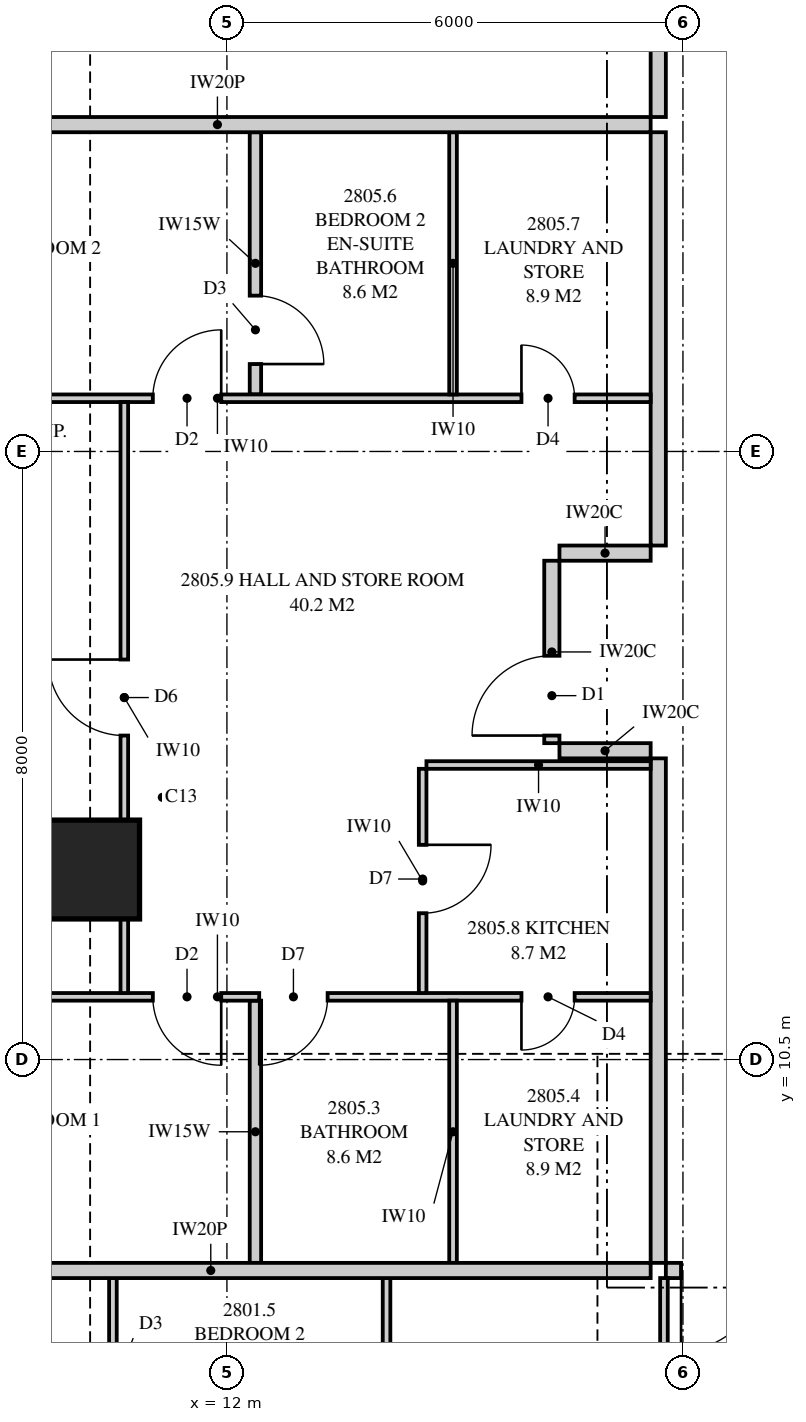
"""IFC4 building model, lengths in metres.
Left out: names, types, materials, properties, quantities, classifications, styles, units other than length and angle.
Written with IfcOpenShell. Run it as: python <this file> out.ifc"""

import sys

from ifc_helpers import new_model, si_unit, direction, frame, frame_2d, origin, origin_2d, place, context, subcontext, project, spatial, polyline, rectangle, outline, extrude, element, fill, save


model = new_model("IFC4")
c1 = context("Model", 3, precision=1e-05, world=origin(), true_north=direction((0.0, 1.0)))
c2 = subcontext(c1, "Body", "Model", "MODEL_VIEW")
j1 = project(units=[si_unit("LENGTHUNIT", "METRE"), si_unit("PLANEANGLEUNIT", "RADIAN")], contexts=[c1])
p1 = place(None, origin())
s1 = spatial("IfcSite", under=j1, at=p1, CompositionType="ELEMENT")
p2 = place(p1, origin())
s2 = spatial("IfcBuilding", under=s1, at=p2, CompositionType="ELEMENT")
p3 = place(p2, frame((0.0, 0.0, 104.85)))
s3 = spatial("IfcBuildingStorey", under=s2, at=p3, CompositionType="ELEMENT", Elevation=104.85)
p4 = place(p3, frame((10.2, 13.0, 0.0), z_axis=(0.0, 0.0, 1.0), x_axis=(1.0, 0.0, 0.0)))
e1 = element("IfcColumn", 1, at=p4, inside=s3, PredefinedType="COLUMN", context=c2, shape_type="SweptSolid", body=[
    extrude(rectangle(XDim=1.3, YDim=1.3, at=origin_2d()), origin(), (0.0, 0.0, 1.0), 3.35),
])
p5 = place(p3, frame((17.775, 7.725, 0.0), z_axis=(0.0, 0.0, 1.0), x_axis=(1.0, 0.0, 0.0)))
e2 = element("IfcWall", 2, at=p5, inside=s3, PredefinedType="PARTITIONING", context=c2, shape_type="SweptSolid", body=[
    extrude(rectangle(XDim=8.225, YDim=0.2, at=frame_2d((4.113, 0.0))), origin(), (0.0, 0.0, 1.0), 3.11),
])
p6 = place(p5, frame((0.2, 0.0, 0.0)))
e3 = element("IfcOpeningElement", 3, at=p6, cuts=e2, PredefinedType="OPENING", context=c2, shape_type="SweptSolid", body=[
    extrude(rectangle(XDim=1.05, YDim=2.2, at=frame_2d((0.525, 1.1))), frame((0.0, 0.11, 0.0), z_axis=(0.0, -1.0, 0.0), x_axis=(1.0, 0.0, 0.0)), (0.0, 0.0, 1.0), 0.22),
])
p7 = place(p3, frame((10.5, 2.76, 0.0), z_axis=(0.0, 0.0, 1.0), x_axis=(0.0, 1.0, 0.0)))
e4 = element("IfcWall", 4, at=p7, inside=s3, PredefinedType="PARTITIONING", context=c2, shape_type="SweptSolid", body=[
    extrude(outline(polyline([(0.0, 0.0), (4.865, 0.0), (4.865, 2.51), (0.368, 2.51), (0.368, 2.15), (0.0, 2.15), (0.0, 0.0)])), frame((0.0, 0.05, 0.0), z_axis=(0.0, -1.0, 0.0), x_axis=(1.0, 0.0, 0.0)), (0.0, 0.0, 1.0), 0.1),
])
p8 = place(p7, frame((0.766, 0.0, 0.0)))
e5 = element("IfcOpeningElement", 5, at=p8, cuts=e4, PredefinedType="OPENING", context=c2, shape_type="SweptSolid", body=[
    extrude(rectangle(XDim=0.9, YDim=2.1, at=frame_2d((0.45, 1.05))), frame((0.0, 0.06, 0.0), z_axis=(0.0, -1.0, 0.0), x_axis=(1.0, 0.0, 0.0)), (0.0, 0.0, 1.0), 0.12),
])
p9 = place(p7, frame((2.941, 0.0, 0.0)))
e6 = element("IfcOpeningElement", 6, at=p9, cuts=e4, PredefinedType="OPENING", context=c2, shape_type="SweptSolid", body=[
    extrude(rectangle(XDim=0.9, YDim=2.1, at=frame_2d((0.45, 1.05))), frame((0.0, 0.06, 0.0), z_axis=(0.0, -1.0, 0.0), x_axis=(1.0, 0.0, 0.0)), (0.0, 0.0, 1.0), 0.12),
])
p10 = place(p3, frame((14.1, 0.175, 0.0), z_axis=(0.0, 0.0, 1.0), x_axis=(0.0, 1.0, 0.0)))
e7 = element("IfcWall", 7, at=p10, inside=s3, PredefinedType="PARTITIONING", context=c2, shape_type="SweptSolid", body=[
    extrude(outline(polyline([(0.0, 0.0), (7.45, 0.0), (7.45, 3.11), (2.219, 3.11), (2.219, 2.15), (0.463, 2.15), (0.463, 3.11), (0.0, 3.11), (0.0, 0.0)])), frame((0.0, 0.05, 0.0), z_axis=(0.0, -1.0, 0.0), x_axis=(1.0, 0.0, 0.0)), (0.0, 0.0, 1.0), 0.1),
])
p11 = place(p10, frame((3.6, 0.0, 0.0)))
e8 = element("IfcOpeningElement", 8, at=p11, cuts=e7, PredefinedType="OPENING", context=c2, shape_type="SweptSolid", body=[
    extrude(rectangle(XDim=0.9, YDim=2.1, at=frame_2d((0.45, 1.05))), frame((0.0, 0.06, 0.0), z_axis=(0.0, -1.0, 0.0), x_axis=(1.0, 0.0, 0.0)), (0.0, 0.0, 1.0), 0.12),
])
p12 = place(p3, frame((17.75, 4.675, 0.0), z_axis=(0.0, 0.0, 1.0), x_axis=(0.0, 1.0, 0.0)))
e9 = element("IfcWall", 9, at=p12, inside=s3, PredefinedType="PARTITIONING", context=c2, shape_type="SweptSolid", body=[
    extrude(rectangle(XDim=2.95, YDim=0.1, at=frame_2d((1.475, 0.0))), origin(), (0.0, 0.0, 1.0), 3.11),
])
p13 = place(p3, frame((6.0, 7.725, 0.0), z_axis=(0.0, 0.0, 1.0), x_axis=(1.0, 0.0, 0.0)))
e10 = element("IfcWall", 10, at=p13, inside=s3, PredefinedType="PARTITIONING", context=c2, shape_type="SweptSolid", body=[
    extrude(outline(polyline([(0.0, 0.0), (11.575, 0.0), (11.575, 3.11), (11.212, 3.11), (11.212, 2.541), (10.538, 2.541), (10.538, 3.11), (5.51, 3.11), (5.51, 2.51), (2.969, 2.51), (2.969, 2.541), (2.727, 2.541), (2.727, 2.15), (0.884, 2.15), (0.884, 3.11), (0.0, 3.11), (0.0, 0.0)])), frame((0.0, 0.1, 0.0), z_axis=(0.0, -1.0, 0.0), x_axis=(1.0, 0.0, 0.0)), (0.0, 0.0, 1.0), 0.2),
])
p14 = place(p3, frame((6.175, 22.8, 0.0), z_axis=(0.0, 0.0, 1.0), x_axis=(1.0, 0.0, 0.0)))
e11 = element("IfcWall", 11, at=p14, inside=s3, PredefinedType="PARTITIONING", context=c2, shape_type="SweptSolid", body=[
    extrude(outline(polyline([(0.0, 0.0), (11.4, 0.0), (11.4, 3.11), (5.335, 3.11), (5.335, 2.51), (2.715, 2.51), (2.715, 3.11), (1.685, 3.11), (1.685, 2.15), (0.0, 2.15), (0.0, 0.0)])), frame((0.0, 0.1, 0.0), z_axis=(0.0, -1.0, 0.0), x_axis=(1.0, 0.0, 0.0)), (0.0, 0.0, 1.0), 0.2),
])
p15 = place(p3, frame((17.675, 7.825, 0.0), z_axis=(0.0, 0.0, 1.0), x_axis=(0.0, 1.0, 0.0)))
e12 = element("IfcWall", 12, at=p15, inside=s3, PredefinedType="PARTITIONING", context=c2, shape_type="SweptSolid", body=[
    extrude(outline(polyline([(0.0, 0.0), (6.637, 0.0), (6.637, 3.11), (3.087, 3.11), (3.087, 2.541), (2.413, 2.541), (2.413, 3.11), (0.0, 3.11), (0.0, 0.0)])), frame((0.0, 0.1, 0.0), z_axis=(0.0, -1.0, 0.0), x_axis=(1.0, 0.0, 0.0)), (0.0, 0.0, 1.0), 0.2),
])
p16 = place(p3, frame((6.175, 11.325, 0.0), z_axis=(0.0, 0.0, 1.0), x_axis=(1.0, 0.0, 0.0)))
e13 = element("IfcWall", 13, at=p16, inside=s3, PredefinedType="PARTITIONING", context=c2, shape_type="SweptSolid", body=[
    extrude(outline(polyline([(0.175, 3.11), (0.0, 3.11), (0.0, 0.0), (0.529, 0.0), (0.529, 0.325), (1.021, 0.325), (1.021, 0.0), (11.4, 0.0), (11.4, 3.11), (5.285, 3.11), (5.285, 2.51), (2.765, 2.51), (2.765, 3.11), (2.744, 3.11), (2.744, 2.541), (2.169, 2.541), (2.169, 3.11), (1.918, 3.11), (1.918, 2.15), (1.021, 2.15), (1.021, 1.825), (0.529, 1.825), (0.529, 2.15), (0.175, 2.15), (0.175, 3.11)])), frame((0.0, 0.05, 0.0), z_axis=(0.0, -1.0, 0.0), x_axis=(1.0, 0.0, 0.0)), (0.0, 0.0, 1.0), 0.1),
])
p17 = place(p16, frame((4.85, 0.0, 0.0)))
e14 = element("IfcOpeningElement", 14, at=p17, cuts=e13, PredefinedType="OPENING", context=c2, shape_type="SweptSolid", body=[
    extrude(rectangle(XDim=0.9, YDim=2.1, at=frame_2d((0.45, 1.05))), frame((0.0, 0.06, 0.0), z_axis=(0.0, -1.0, 0.0), x_axis=(1.0, 0.0, 0.0)), (0.0, 0.0, 1.0), 0.12),
])
p18 = place(p16, frame((6.25, 0.0, 0.0)))
e15 = element("IfcOpeningElement", 15, at=p18, cuts=e13, PredefinedType="OPENING", context=c2, shape_type="SweptSolid", body=[
    extrude(rectangle(XDim=0.9, YDim=2.1, at=frame_2d((0.45, 1.05))), frame((0.0, 0.06, 0.0), z_axis=(0.0, -1.0, 0.0), x_axis=(1.0, 0.0, 0.0)), (0.0, 0.0, 1.0), 0.12),
])
p19 = place(p16, frame((9.7, 0.0, 0.0)))
e16 = element("IfcOpeningElement", 16, at=p19, cuts=e13, PredefinedType="OPENING", context=c2, shape_type="SweptSolid", body=[
    extrude(rectangle(XDim=0.7, YDim=2.1, at=frame_2d((0.35, 1.05))), frame((0.0, 0.06, 0.0), z_axis=(0.0, -1.0, 0.0), x_axis=(1.0, 0.0, 0.0)), (0.0, 0.0, 1.0), 0.12),
])
p20 = place(p3, frame((6.175, 19.2, 0.0), z_axis=(0.0, 0.0, 1.0), x_axis=(1.0, 0.0, 0.0)))
e17 = element("IfcWall", 17, at=p20, inside=s3, PredefinedType="PARTITIONING", context=c2, shape_type="SweptSolid", body=[
    extrude(outline(polyline([(0.0, 0.0), (11.4, 0.0), (11.4, 3.11), (5.285, 3.11), (5.285, 2.51), (2.765, 2.51), (2.765, 3.11), (1.635, 3.11), (1.635, 2.15), (0.0, 2.15), (0.0, 3.11), (0.0, 0.0)])), frame((0.0, 0.05, 0.0), z_axis=(0.0, -1.0, 0.0), x_axis=(1.0, 0.0, 0.0)), (0.0, 0.0, 1.0), 0.1),
])
p21 = place(p20, frame((4.85, 0.0, 0.0)))
e18 = element("IfcOpeningElement", 18, at=p21, cuts=e17, PredefinedType="OPENING", context=c2, shape_type="SweptSolid", body=[
    extrude(rectangle(XDim=0.9, YDim=2.1, at=frame_2d((0.45, 1.05))), frame((0.0, 0.06, 0.0), z_axis=(0.0, -1.0, 0.0), x_axis=(1.0, 0.0, 0.0)), (0.0, 0.0, 1.0), 0.12),
])
p22 = place(p20, frame((9.7, 0.0, 0.0)))
e19 = element("IfcOpeningElement", 19, at=p22, cuts=e17, PredefinedType="OPENING", context=c2, shape_type="SweptSolid", body=[
    extrude(rectangle(XDim=0.7, YDim=2.1, at=frame_2d((0.35, 1.05))), frame((0.0, 0.06, 0.0), z_axis=(0.0, -1.0, 0.0), x_axis=(1.0, 0.0, 0.0)), (0.0, 0.0, 1.0), 0.12),
])
p23 = place(p3, frame((12.375, 7.825, 0.0), z_axis=(0.0, 0.0, 1.0), x_axis=(0.0, 1.0, 0.0)))
e20 = element("IfcWall", 20, at=p23, inside=s3, PredefinedType="PLUMBINGWALL", context=c2, shape_type="SweptSolid", body=[
    extrude(outline(polyline([(0.0, 0.0), (3.45, 0.0), (3.45, 3.11), (3.062, 3.11), (3.062, 2.541), (2.438, 2.541), (2.438, 3.11), (0.0, 3.11), (0.0, 0.0)])), frame((0.0, 0.075, 0.0), z_axis=(0.0, -1.0, 0.0), x_axis=(1.0, 0.0, 0.0)), (0.0, 0.0, 1.0), 0.15),
])
p24 = place(p3, frame((14.975, 7.825, 0.0), z_axis=(0.0, 0.0, 1.0), x_axis=(0.0, 1.0, 0.0)))
e21 = element("IfcWall", 21, at=p24, inside=s3, PredefinedType="PARTITIONING", context=c2, shape_type="SweptSolid", body=[
    extrude(outline(polyline([(0.0, 0.0), (3.45, 0.0), (3.45, 3.11), (3.037, 3.11), (3.037, 2.541), (2.463, 2.541), (2.463, 3.11), (0.0, 3.11), (0.0, 0.0)])), frame((0.0, 0.05, 0.0), z_axis=(0.0, -1.0, 0.0), x_axis=(1.0, 0.0, 0.0)), (0.0, 0.0, 1.0), 0.1),
])
p25 = place(p3, frame((12.375, 19.25, 0.0), z_axis=(0.0, 0.0, 1.0), x_axis=(0.0, 1.0, 0.0)))
e22 = element("IfcWall", 22, at=p25, inside=s3, PredefinedType="PLUMBINGWALL", context=c2, shape_type="SweptSolid", body=[
    extrude(rectangle(XDim=3.45, YDim=0.15, at=frame_2d((1.725, 0.0))), origin(), (0.0, 0.0, 1.0), 3.11),
])
p26 = place(p25, frame((0.4, 0.0, 0.0)))
e23 = element("IfcOpeningElement", 23, at=p26, cuts=e22, PredefinedType="OPENING", context=c2, shape_type="SweptSolid", body=[
    extrude(rectangle(XDim=0.9, YDim=2.1, at=frame_2d((0.45, 1.05))), frame((0.0, 0.085, 0.0), z_axis=(0.0, -1.0, 0.0), x_axis=(1.0, 0.0, 0.0)), (0.0, 0.0, 1.0), 0.17),
])
p27 = place(p3, frame((14.975, 19.25, 0.0), z_axis=(0.0, 0.0, 1.0), x_axis=(0.0, 1.0, 0.0)))
e24 = element("IfcWall", 24, at=p27, inside=s3, PredefinedType="PARTITIONING", context=c2, shape_type="SweptSolid", body=[
    extrude(rectangle(XDim=3.45, YDim=0.1, at=frame_2d((1.725, 0.0))), origin(), (0.0, 0.0, 1.0), 3.11),
])
p28 = place(p3, frame((14.575, 11.375, 0.0), z_axis=(0.0, 0.0, 1.0), x_axis=(0.0, 1.0, 0.0)))
e25 = element("IfcWall", 25, at=p28, inside=s3, PredefinedType="PARTITIONING", context=c2, shape_type="SweptSolid", body=[
    extrude(rectangle(XDim=2.95, YDim=0.1, at=frame_2d((1.475, 0.0))), origin(), (0.0, 0.0, 1.0), 3.11),
])
p29 = place(p28, frame((1.05, 0.0, 0.0)))
e26 = element("IfcOpeningElement", 26, at=p29, cuts=e25, PredefinedType="OPENING", context=c2, shape_type="SweptSolid", body=[
    extrude(rectangle(XDim=0.9, YDim=2.1, at=frame_2d((0.45, 1.05))), frame((0.0, 0.06, 0.0), z_axis=(0.0, -1.0, 0.0), x_axis=(1.0, 0.0, 0.0)), (0.0, 0.0, 1.0), 0.12),
])
p30 = place(p3, frame((14.625, 14.375, 0.0), z_axis=(0.0, 0.0, 1.0), x_axis=(1.0, 0.0, 0.0)))
e27 = element("IfcWall", 27, at=p30, inside=s3, PredefinedType="PARTITIONING", context=c2, shape_type="SweptSolid", body=[
    extrude(rectangle(XDim=2.95, YDim=0.1, at=frame_2d((1.475, 0.0))), origin(), (0.0, 0.0, 1.0), 3.11),
])
p31 = place(p3, frame((10.65, 11.375, 0.0), z_axis=(0.0, 0.0, 1.0), x_axis=(0.0, 1.0, 0.0)))
e28 = element("IfcWall", 28, at=p31, inside=s3, PredefinedType="PARTITIONING", context=c2, shape_type="SweptSolid", body=[
    extrude(outline(polyline([(0.0, 0.0), (7.775, 0.0), (7.775, 3.11), (7.775, 2.51), (1.685, 2.51), (0.0, 2.51), (0.0, 3.11), (0.0, 0.0)])), frame((0.0, 0.05, 0.0), z_axis=(0.0, -1.0, 0.0), x_axis=(1.0, 0.0, 0.0)), (0.0, 0.0, 1.0), 0.1),
])
p32 = place(p31, frame((3.387, 0.0, 0.0)))
e29 = element("IfcOpeningElement", 29, at=p32, cuts=e28, PredefinedType="OPENING", context=c2, shape_type="SweptSolid", body=[
    extrude(rectangle(XDim=1.0, YDim=2.1, at=frame_2d((0.5, 1.05))), frame((0.0, 0.06, 0.0), z_axis=(0.0, -1.0, 0.0), x_axis=(1.0, 0.0, 0.0)), (0.0, 0.0, 1.0), 0.12),
])
p33 = place(p3, frame((17.675, 22.9, 0.0), z_axis=(0.0, 0.0, 1.0), x_axis=(0.0, 1.0, 0.0)))
e30 = element("IfcWall", 30, at=p33, inside=s3, PredefinedType="PARTITIONING", context=c2, shape_type="SweptSolid", body=[
    extrude(outline(polyline([(0.0, 0.0), (6.275, 0.0), (6.275, 3.11), (3.862, 3.11), (3.862, 2.541), (3.188, 2.541), (3.188, 3.11), (0.0, 3.11), (0.0, 0.0)])), frame((0.0, 0.1, 0.0), z_axis=(0.0, -1.0, 0.0), x_axis=(1.0, 0.0, 0.0)), (0.0, 0.0, 1.0), 0.2),
])
p34 = place(p33, frame((2.238, 0.0, 0.0)))
e31 = element("IfcOpeningElement", 31, at=p34, cuts=e30, PredefinedType="OPENING", context=c2, shape_type="SweptSolid", body=[
    extrude(rectangle(XDim=1.8, YDim=2.1, at=frame_2d((0.9, 1.05))), frame((0.0, 0.11, 0.0), z_axis=(0.0, -1.0, 0.0), x_axis=(1.0, 0.0, 0.0)), (0.0, 0.0, 1.0), 0.22),
])
p35 = place(p3, frame((17.675, 17.262, 0.0), z_axis=(0.0, 0.0, 1.0), x_axis=(0.0, 1.0, 0.0)))
e32 = element("IfcWall", 32, at=p35, inside=s3, PredefinedType="PARTITIONING", context=c2, shape_type="SweptSolid", body=[
    extrude(rectangle(XDim=5.438, YDim=0.2, at=frame_2d((2.719, 0.0))), origin(), (0.0, 0.0, 1.0), 3.11),
])
p36 = place(p3, frame((16.275, 14.663, 0.0), z_axis=(0.0, 0.0, 1.0), x_axis=(0.0, 1.0, 0.0)))
e33 = element("IfcWall", 33, at=p36, inside=s3, PredefinedType="PARTITIONING", context=c2, shape_type="SweptSolid", body=[
    extrude(rectangle(XDim=2.4, YDim=0.2, at=frame_2d((1.2, 0.0))), origin(), (0.0, 0.0, 1.0), 3.11),
])
p37 = place(p36, frame((0.1, 0.0, 0.0)))
e34 = element("IfcOpeningElement", 34, at=p37, cuts=e33, PredefinedType="OPENING", context=c2, shape_type="SweptSolid", body=[
    extrude(rectangle(XDim=1.05, YDim=2.2, at=frame_2d((0.525, 1.1))), frame((0.0, 0.11, 0.0), z_axis=(0.0, -1.0, 0.0), x_axis=(1.0, 0.0, 0.0)), (0.0, 0.0, 1.0), 0.22),
])
for number, where, z_axis, x_axis in (
    (35, (17.575, 14.562, 0.0), (0.0, 0.0, 1.0), (-1.0, 0.0, 0.0)),
    (36, (17.575, 17.163, 0.0), (0.0, 0.0, 1.0), (-1.0, 0.0, 0.0)),
):
    element("IfcWall", number, at=place(p3, frame(where, z_axis=z_axis, x_axis=x_axis)), inside=s3, PredefinedType="PARTITIONING", context=c2, shape_type="SweptSolid", body=[
        extrude(rectangle(XDim=1.2, YDim=0.2, at=frame_2d((0.6, 0.0))), origin(), (0.0, 0.0, 1.0), 3.11),
    ])
p38 = place(p6, frame((1.05, 0.0, 0.0), z_axis=(0.0, 0.0, 1.0), x_axis=(-1.0, 0.0, 0.0)))
e37 = element("IfcDoor", 37, at=p38, inside=s3, OperationType="SINGLE_SWING_RIGHT", PredefinedType="DOOR", context=c2, shape_type="SweptSolid", body=[
    extrude(rectangle(XDim=1.05, YDim=2.2, at=frame_2d((0.525, 1.1))), frame((0.0, 0.025, 0.0), z_axis=(0.0, -1.0, 0.0), x_axis=(1.0, 0.0, 0.0)), (0.0, 0.0, 1.0), 0.05),
])
fill(e3, e37)
p39 = place(p37, origin())
e38 = element("IfcDoor", 38, at=p39, inside=s3, OperationType="SINGLE_SWING_LEFT", PredefinedType="DOOR", context=c2, shape_type="SweptSolid", body=[
    extrude(rectangle(XDim=1.05, YDim=2.2, at=frame_2d((0.525, 1.1))), frame((0.0, 0.025, 0.0), z_axis=(0.0, -1.0, 0.0), x_axis=(1.0, 0.0, 0.0)), (0.0, 0.0, 1.0), 0.05),
])
fill(e34, e38)
p40 = place(p17, frame((0.9, 0.0, 0.0), z_axis=(0.0, 0.0, 1.0), x_axis=(-1.0, 0.0, 0.0)))
e39 = element("IfcDoor", 39, at=p40, inside=s3, OperationType="SINGLE_SWING_LEFT", PredefinedType="DOOR", context=c2, shape_type="SweptSolid", body=[
    extrude(rectangle(XDim=0.9, YDim=2.1, at=frame_2d((0.45, 1.05))), frame((0.0, 0.025, 0.0), z_axis=(0.0, -1.0, 0.0), x_axis=(1.0, 0.0, 0.0)), (0.0, 0.0, 1.0), 0.05),
])
fill(e14, e39)
p41 = place(p18, frame((0.9, 0.0, 0.0), z_axis=(0.0, 0.0, 1.0), x_axis=(-1.0, 0.0, 0.0)))
e40 = element("IfcDoor", 40, at=p41, inside=s3, OperationType="SINGLE_SWING_RIGHT", PredefinedType="DOOR", context=c2, shape_type="SweptSolid", body=[
    extrude(rectangle(XDim=0.9, YDim=2.1, at=frame_2d((0.45, 1.05))), frame((0.0, 0.025, 0.0), z_axis=(0.0, -1.0, 0.0), x_axis=(1.0, 0.0, 0.0)), (0.0, 0.0, 1.0), 0.05),
])
fill(e15, e40)
p42 = place(p19, frame((0.7, 0.0, 0.0), z_axis=(0.0, 0.0, 1.0), x_axis=(-1.0, 0.0, 0.0)))
e41 = element("IfcDoor", 41, at=p42, inside=s3, OperationType="SINGLE_SWING_RIGHT", PredefinedType="DOOR", context=c2, shape_type="SweptSolid", body=[
    extrude(rectangle(XDim=0.7, YDim=2.1, at=frame_2d((0.35, 1.05))), frame((0.0, 0.025, 0.0), z_axis=(0.0, -1.0, 0.0), x_axis=(1.0, 0.0, 0.0)), (0.0, 0.0, 1.0), 0.05),
])
fill(e16, e41)
p43 = place(p21, origin())
e42 = element("IfcDoor", 42, at=p43, inside=s3, OperationType="SINGLE_SWING_RIGHT", PredefinedType="DOOR", context=c2, shape_type="SweptSolid", body=[
    extrude(rectangle(XDim=0.9, YDim=2.1, at=frame_2d((0.45, 1.05))), frame((0.0, 0.025, 0.0), z_axis=(0.0, -1.0, 0.0), x_axis=(1.0, 0.0, 0.0)), (0.0, 0.0, 1.0), 0.05),
])
fill(e18, e42)
p44 = place(p26, frame((0.9, 0.0, 0.0), z_axis=(0.0, 0.0, 1.0), x_axis=(-1.0, 0.0, 0.0)))
e43 = element("IfcDoor", 43, at=p44, inside=s3, OperationType="SINGLE_SWING_RIGHT", PredefinedType="DOOR", context=c2, shape_type="SweptSolid", body=[
    extrude(rectangle(XDim=0.9, YDim=2.1, at=frame_2d((0.45, 1.05))), frame((0.0, 0.025, 0.0), z_axis=(0.0, -1.0, 0.0), x_axis=(1.0, 0.0, 0.0)), (0.0, 0.0, 1.0), 0.05),
])
fill(e23, e43)
p45 = place(p22, origin())
e44 = element("IfcDoor", 44, at=p45, inside=s3, OperationType="SINGLE_SWING_LEFT", PredefinedType="DOOR", context=c2, shape_type="SweptSolid", body=[
    extrude(rectangle(XDim=0.7, YDim=2.1, at=frame_2d((0.35, 1.05))), frame((0.0, 0.025, 0.0), z_axis=(0.0, -1.0, 0.0), x_axis=(1.0, 0.0, 0.0)), (0.0, 0.0, 1.0), 0.05),
])
fill(e19, e44)
p46 = place(p29, frame((0.9, 0.0, 0.0), z_axis=(0.0, 0.0, 1.0), x_axis=(-1.0, 0.0, 0.0)))
e45 = element("IfcDoor", 45, at=p46, inside=s3, OperationType="SINGLE_SWING_LEFT", PredefinedType="DOOR", context=c2, shape_type="SweptSolid", body=[
    extrude(rectangle(XDim=0.9, YDim=2.1, at=frame_2d((0.45, 1.05))), frame((0.0, 0.025, 0.0), z_axis=(0.0, -1.0, 0.0), x_axis=(1.0, 0.0, 0.0)), (0.0, 0.0, 1.0), 0.05),
])
fill(e26, e45)
p47 = place(p32, origin())
e46 = element("IfcDoor", 46, at=p47, inside=s3, OperationType="SINGLE_SWING_RIGHT", PredefinedType="DOOR", context=c2, shape_type="SweptSolid", body=[
    extrude(rectangle(XDim=1.0, YDim=2.1, at=frame_2d((0.5, 1.05))), frame((0.0, 0.025, 0.0), z_axis=(0.0, -1.0, 0.0), x_axis=(1.0, 0.0, 0.0)), (0.0, 0.0, 1.0), 0.05),
])
fill(e29, e46)
save(model, sys.argv[1])
